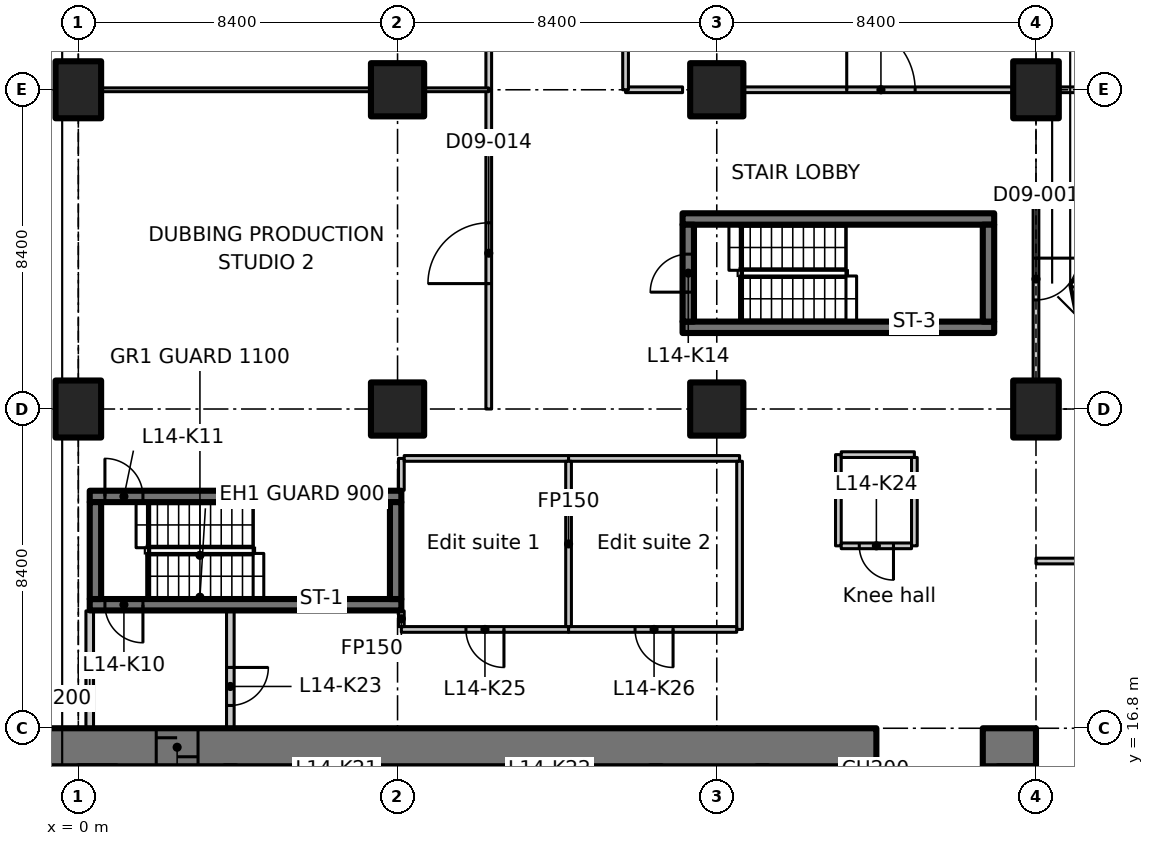
"""IFC4 building model, lengths in metres.
Left out: names, types, materials, properties, quantities, classifications, styles, units other than length and angle.
Written with IfcOpenShell. Run it as: python <this file> out.ifc"""

import sys

from ifc_helpers import new_model, si_unit, direction, frame, frame_2d, origin, origin_2d, place, context, subcontext, project, spatial, polyline, rectangle, outline, extrude, element, fill, save


model = new_model("IFC4")
c1 = context("Model", 3, precision=1e-05, world=origin(), true_north=direction((0.0, 1.0)))
c2 = subcontext(c1, "Body", "Model", "MODEL_VIEW")
j1 = project(units=[si_unit("LENGTHUNIT", "METRE"), si_unit("PLANEANGLEUNIT", "RADIAN")], contexts=[c1])
p1 = place(None, origin())
s1 = spatial("IfcSite", under=j1, at=p1, CompositionType="ELEMENT")
p2 = place(p1, origin())
s2 = spatial("IfcBuilding", under=s1, at=p2, CompositionType="ELEMENT")
p3 = place(p2, frame((0.0, 0.0, 65.3)))
s3 = spatial("IfcBuildingStorey", under=s2, at=p3, CompositionType="ELEMENT", Elevation=65.3)
for number, where, z_axis, x_axis in (
    (1, (0.0, 25.2, 0.0), (0.0, 0.0, 1.0), (1.0, 0.0, 0.0)),
    (2, (0.0, 33.6, 0.0), (0.0, 0.0, 1.0), (1.0, 0.0, 0.0)),
):
    element("IfcColumn", number, at=place(p3, frame(where, z_axis=z_axis, x_axis=x_axis)), inside=s3, PredefinedType="COLUMN", context=c2, shape_type="SweptSolid", body=[
        extrude(rectangle(XDim=1.2, YDim=1.5, at=origin_2d()), origin(), (0.0, 0.0, 1.0), 3.35),
    ])
for number, where, z_axis, x_axis in (
    (3, (8.4, 25.2, 0.0), (0.0, 0.0, 1.0), (1.0, 0.0, 0.0)),
    (4, (8.4, 33.6, 0.0), (0.0, 0.0, 1.0), (1.0, 0.0, 0.0)),
    (5, (16.8, 25.2, 0.0), (0.0, 0.0, 1.0), (1.0, 0.0, 0.0)),
    (6, (16.8, 33.6, 0.0), (0.0, 0.0, 1.0), (1.0, 0.0, 0.0)),
):
    element("IfcColumn", number, at=place(p3, frame(where, z_axis=z_axis, x_axis=x_axis)), inside=s3, PredefinedType="COLUMN", context=c2, shape_type="SweptSolid", body=[
        extrude(rectangle(XDim=1.4, YDim=1.4, at=origin_2d()), origin(), (0.0, 0.0, 1.0), 3.35),
    ])
for number, where, z_axis, x_axis in (
    (7, (25.2, 25.2, 0.0), (0.0, 0.0, 1.0), (1.0, 0.0, 0.0)),
    (8, (25.2, 33.6, 0.0), (0.0, 0.0, 1.0), (1.0, 0.0, 0.0)),
):
    element("IfcColumn", number, at=place(p3, frame(where, z_axis=z_axis, x_axis=x_axis)), inside=s3, PredefinedType="COLUMN", context=c2, shape_type="SweptSolid", body=[
        extrude(rectangle(XDim=1.2, YDim=1.5, at=origin_2d()), origin(), (0.0, 0.0, 1.0), 3.35),
    ])
p4 = place(p3, frame((-1.1, 16.3, 0.0), z_axis=(0.0, 0.0, 1.0), x_axis=(1.0, 0.0, 0.0)))
e9 = element("IfcWall", 9, at=p4, inside=s3, PredefinedType="SHEAR", context=c2, shape_type="SweptSolid", body=[
    extrude(rectangle(XDim=22.1, YDim=1.0, at=frame_2d((11.05, 0.0))), origin(), (0.0, 0.0, 1.0), 3.35),
])
p5 = place(p4, frame((3.15, 0.0, 0.0)))
e10 = element("IfcOpeningElement", 10, at=p5, cuts=e9, PredefinedType="OPENING", context=c2, shape_type="SweptSolid", body=[
    extrude(rectangle(XDim=1.1, YDim=2.3, at=frame_2d((0.55, 1.15))), frame((0.0, 0.51, 0.0), z_axis=(0.0, -1.0, 0.0), x_axis=(1.0, 0.0, 0.0)), (0.0, 0.0, 1.0), 1.02),
])
p6 = place(p3, frame((23.8, 16.3, 0.0), z_axis=(0.0, 0.0, 1.0), x_axis=(1.0, 0.0, 0.0)))
e11 = element("IfcWall", 11, at=p6, inside=s3, PredefinedType="SHEAR", context=c2, shape_type="SweptSolid", body=[
    extrude(rectangle(XDim=1.4, YDim=1.0, at=frame_2d((0.7, 0.0))), origin(), (0.0, 0.0, 1.0), 3.35),
])
p7 = place(p3, frame((24.7, 12.6, 0.0), z_axis=(0.0, 0.0, 1.0), x_axis=(0.0, 1.0, 0.0)))
e12 = element("IfcWall", 12, at=p7, inside=s3, PredefinedType="SHEAR", context=c2, shape_type="SweptSolid", body=[
    extrude(rectangle(XDim=3.2, YDim=1.0, at=frame_2d((1.6, 0.0))), origin(), (0.0, 0.0, 1.0), 3.35),
])
p8 = place(p3, frame((8.5, 20.05, 0.0), z_axis=(0.0, 0.0, 1.0), x_axis=(-1.0, 0.0, 0.0)))
e13 = element("IfcWall", 13, at=p8, inside=s3, PredefinedType="SHEAR", context=c2, shape_type="SweptSolid", body=[
    extrude(rectangle(XDim=8.2, YDim=0.3, at=frame_2d((4.1, 0.0))), origin(), (0.0, 0.0, 1.0), 3.35),
])
p9 = place(p8, frame((6.8, 0.0, 0.0)))
e14 = element("IfcOpeningElement", 14, at=p9, cuts=e13, PredefinedType="OPENING", context=c2, shape_type="SweptSolid", body=[
    extrude(rectangle(XDim=1.0, YDim=2.1, at=frame_2d((0.5, 1.05))), frame((0.0, 0.16, 0.0), z_axis=(0.0, -1.0, 0.0), x_axis=(1.0, 0.0, 0.0)), (0.0, 0.0, 1.0), 0.32),
])
p10 = place(p3, frame((0.3, 22.9, 0.0), z_axis=(0.0, 0.0, 1.0), x_axis=(1.0, 0.0, 0.0)))
e15 = element("IfcWall", 15, at=p10, inside=s3, PredefinedType="SHEAR", context=c2, shape_type="SweptSolid", body=[
    extrude(rectangle(XDim=8.2, YDim=0.3, at=frame_2d((4.1, 0.0))), origin(), (0.0, 0.0, 1.0), 3.35),
])
p11 = place(p10, frame((0.4, 0.0, 0.0)))
e16 = element("IfcOpeningElement", 16, at=p11, cuts=e15, PredefinedType="OPENING", context=c2, shape_type="SweptSolid", body=[
    extrude(rectangle(XDim=1.0, YDim=2.1, at=frame_2d((0.5, 1.05))), frame((0.0, 0.16, 0.0), z_axis=(0.0, -1.0, 0.0), x_axis=(1.0, 0.0, 0.0)), (0.0, 0.0, 1.0), 0.32),
])
for number, where, z_axis, x_axis in (
    (17, (0.45, 20.2, 0.0), (0.0, 0.0, 1.0), (0.0, 1.0, 0.0)),
    (18, (8.35, 20.2, 0.0), (0.0, 0.0, 1.0), (0.0, 1.0, 0.0)),
):
    element("IfcWall", number, at=place(p3, frame(where, z_axis=z_axis, x_axis=x_axis)), inside=s3, PredefinedType="SHEAR", context=c2, shape_type="SweptSolid", body=[
        extrude(rectangle(XDim=2.55, YDim=0.3, at=frame_2d((1.275, 0.0))), origin(), (0.0, 0.0, 1.0), 3.35),
    ])
for number, where, z_axis, x_axis in (
    (19, (15.9, 27.35, 0.0), (0.0, 0.0, 1.0), (1.0, 0.0, 0.0)),
    (20, (15.9, 30.2, 0.0), (0.0, 0.0, 1.0), (1.0, 0.0, 0.0)),
):
    element("IfcWall", number, at=place(p3, frame(where, z_axis=z_axis, x_axis=x_axis)), inside=s3, PredefinedType="SHEAR", context=c2, shape_type="SweptSolid", body=[
        extrude(rectangle(XDim=8.2, YDim=0.3, at=frame_2d((4.1, 0.0))), origin(), (0.0, 0.0, 1.0), 3.35),
    ])
p12 = place(p3, frame((16.05, 27.5, 0.0), z_axis=(0.0, 0.0, 1.0), x_axis=(0.0, 1.0, 0.0)))
e21 = element("IfcWall", 21, at=p12, inside=s3, PredefinedType="SHEAR", context=c2, shape_type="SweptSolid", body=[
    extrude(rectangle(XDim=2.55, YDim=0.3, at=frame_2d((1.275, 0.0))), origin(), (0.0, 0.0, 1.0), 3.35),
])
p13 = place(p12, frame((0.775, 0.0, 0.0)))
e22 = element("IfcOpeningElement", 22, at=p13, cuts=e21, PredefinedType="OPENING", context=c2, shape_type="SweptSolid", body=[
    extrude(rectangle(XDim=1.0, YDim=2.1, at=frame_2d((0.5, 1.05))), frame((0.0, 0.16, 0.0), z_axis=(0.0, -1.0, 0.0), x_axis=(1.0, 0.0, 0.0)), (0.0, 0.0, 1.0), 0.32),
])
p14 = place(p3, frame((23.95, 27.5, 0.0), z_axis=(0.0, 0.0, 1.0), x_axis=(0.0, 1.0, 0.0)))
e23 = element("IfcWall", 23, at=p14, inside=s3, PredefinedType="SHEAR", context=c2, shape_type="SweptSolid", body=[
    extrude(rectangle(XDim=2.55, YDim=0.3, at=frame_2d((1.275, 0.0))), origin(), (0.0, 0.0, 1.0), 3.35),
])
p15 = place(p3, frame((0.3, 16.812, 0.0), z_axis=(0.0, 0.0, 1.0), x_axis=(0.0, 1.0, 0.0)))
e24 = element("IfcWall", 24, at=p15, inside=s3, PredefinedType="PARTITIONING", context=c2, shape_type="SweptSolid", body=[
    extrude(rectangle(XDim=3.076, YDim=0.2, at=frame_2d((1.538, 0.0))), origin(), (0.0, 0.0, 1.0), 2.98),
])
p16 = place(p3, frame((4.0, 19.888, 0.0), z_axis=(0.0, 0.0, 1.0), x_axis=(0.0, -1.0, 0.0)))
e25 = element("IfcWall", 25, at=p16, inside=s3, PredefinedType="PARTITIONING", context=c2, shape_type="SweptSolid", body=[
    extrude(rectangle(XDim=3.076, YDim=0.2, at=frame_2d((1.538, 0.0))), origin(), (0.0, 0.0, 1.0), 3.35),
])
p17 = place(p16, frame((1.488, 0.0, 0.0)))
e26 = element("IfcOpeningElement", 26, at=p17, cuts=e25, PredefinedType="OPENING", context=c2, shape_type="SweptSolid", body=[
    extrude(rectangle(XDim=1.0, YDim=2.1, at=frame_2d((0.5, 1.05))), frame((0.0, 0.11, 0.0), z_axis=(0.0, -1.0, 0.0), x_axis=(1.0, 0.0, 0.0)), (0.0, 0.0, 1.0), 0.22),
])
p18 = place(p3, frame((12.9, 19.4, 0.0), z_axis=(0.0, 0.0, 1.0), x_axis=(-1.0, 0.0, 0.0)))
e27 = element("IfcWall", 27, at=p18, inside=s3, PredefinedType="PARTITIONING", context=c2, shape_type="SweptSolid", body=[
    extrude(rectangle(XDim=4.4, YDim=0.15, at=frame_2d((2.2, 0.0))), origin(), (0.0, 0.0, 1.0), 3.35),
])
p19 = place(p18, frame((1.7, 0.0, 0.0)))
e28 = element("IfcOpeningElement", 28, at=p19, cuts=e27, PredefinedType="OPENING", context=c2, shape_type="SweptSolid", body=[
    extrude(rectangle(XDim=1.0, YDim=2.1, at=frame_2d((0.5, 1.05))), frame((0.0, 0.085, 0.0), z_axis=(0.0, -1.0, 0.0), x_axis=(1.0, 0.0, 0.0)), (0.0, 0.0, 1.0), 0.17),
])
p20 = place(p3, frame((8.5, 19.475, 0.0), z_axis=(0.0, 0.0, 1.0), x_axis=(0.0, 1.0, 0.0)))
e29 = element("IfcWall", 29, at=p20, inside=s3, PredefinedType="PARTITIONING", context=c2, shape_type="SweptSolid", body=[
    extrude(rectangle(XDim=0.413, YDim=0.15, at=frame_2d((0.207, 0.0))), origin(), (0.0, 0.0, 1.0), 3.35),
])
p21 = place(p3, frame((8.5, 23.062, 0.0), z_axis=(0.0, 0.0, 1.0), x_axis=(0.0, 1.0, 0.0)))
e30 = element("IfcWall", 30, at=p21, inside=s3, PredefinedType="PARTITIONING", context=c2, shape_type="SweptSolid", body=[
    extrude(rectangle(XDim=0.838, YDim=0.15, at=frame_2d((0.419, 0.0))), origin(), (0.0, 0.0, 1.0), 3.35),
])
p22 = place(p3, frame((8.575, 23.9, 0.0), z_axis=(0.0, 0.0, 1.0), x_axis=(1.0, 0.0, 0.0)))
e31 = element("IfcWall", 31, at=p22, inside=s3, PredefinedType="PARTITIONING", context=c2, shape_type="SweptSolid", body=[
    extrude(rectangle(XDim=4.325, YDim=0.15, at=frame_2d((2.163, 0.0))), origin(), (0.0, 0.0, 1.0), 3.35),
])
p23 = place(p3, frame((12.9, 23.9, 0.0), z_axis=(0.0, 0.0, 1.0), x_axis=(1.0, 0.0, 0.0)))
e32 = element("IfcWall", 32, at=p23, inside=s3, PredefinedType="PARTITIONING", context=c2, shape_type="SweptSolid", body=[
    extrude(rectangle(XDim=4.5, YDim=0.15, at=frame_2d((2.25, 0.0))), origin(), (0.0, 0.0, 1.0), 3.35),
])
p24 = place(p3, frame((17.4, 23.825, 0.0), z_axis=(0.0, 0.0, 1.0), x_axis=(0.0, -1.0, 0.0)))
e33 = element("IfcWall", 33, at=p24, inside=s3, PredefinedType="PARTITIONING", context=c2, shape_type="SweptSolid", body=[
    extrude(rectangle(XDim=4.425, YDim=0.15, at=frame_2d((2.212, 0.0))), origin(), (0.0, 0.0, 1.0), 3.35),
])
p25 = place(p3, frame((17.325, 19.4, 0.0), z_axis=(0.0, 0.0, 1.0), x_axis=(-1.0, 0.0, 0.0)))
e34 = element("IfcWall", 34, at=p25, inside=s3, PredefinedType="PARTITIONING", context=c2, shape_type="SweptSolid", body=[
    extrude(rectangle(XDim=4.425, YDim=0.15, at=frame_2d((2.212, 0.0))), origin(), (0.0, 0.0, 1.0), 3.35),
])
p26 = place(p25, frame((1.675, 0.0, 0.0)))
e35 = element("IfcOpeningElement", 35, at=p26, cuts=e34, PredefinedType="OPENING", context=c2, shape_type="SweptSolid", body=[
    extrude(rectangle(XDim=1.0, YDim=2.1, at=frame_2d((0.5, 1.05))), frame((0.0, 0.085, 0.0), z_axis=(0.0, -1.0, 0.0), x_axis=(1.0, 0.0, 0.0)), (0.0, 0.0, 1.0), 0.17),
])
p27 = place(p3, frame((12.9, 23.825, 0.0), z_axis=(0.0, 0.0, 1.0), x_axis=(0.0, -1.0, 0.0)))
e36 = element("IfcWall", 36, at=p27, inside=s3, PredefinedType="PARTITIONING", context=c2, shape_type="SweptSolid", body=[
    extrude(rectangle(XDim=4.35, YDim=0.15, at=frame_2d((2.175, 0.0))), origin(), (0.0, 0.0, 1.0), 3.35),
])
p28 = place(p3, frame((20.0, 21.6, 0.0), z_axis=(0.0, 0.0, 1.0), x_axis=(0.0, 1.0, 0.0)))
e37 = element("IfcWall", 37, at=p28, inside=s3, PredefinedType="PARTITIONING", context=c2, shape_type="SweptSolid", body=[
    extrude(rectangle(XDim=2.4, YDim=0.15, at=frame_2d((1.2, 0.0))), origin(), (0.0, 0.0, 1.0), 3.35),
])
p29 = place(p3, frame((20.075, 24.0, 0.0), z_axis=(0.0, 0.0, 1.0), x_axis=(1.0, 0.0, 0.0)))
e38 = element("IfcWall", 38, at=p29, inside=s3, PredefinedType="PARTITIONING", context=c2, shape_type="SweptSolid", body=[
    extrude(rectangle(XDim=1.925, YDim=0.15, at=frame_2d((0.962, 0.0))), origin(), (0.0, 0.0, 1.0), 3.35),
])
p30 = place(p3, frame((22.0, 23.925, 0.0), z_axis=(0.0, 0.0, 1.0), x_axis=(0.0, -1.0, 0.0)))
e39 = element("IfcWall", 39, at=p30, inside=s3, PredefinedType="PARTITIONING", context=c2, shape_type="SweptSolid", body=[
    extrude(rectangle(XDim=2.325, YDim=0.15, at=frame_2d((1.163, 0.0))), origin(), (0.0, 0.0, 1.0), 3.35),
])
p31 = place(p3, frame((21.925, 21.6, 0.0), z_axis=(0.0, 0.0, 1.0), x_axis=(-1.0, 0.0, 0.0)))
e40 = element("IfcWall", 40, at=p31, inside=s3, PredefinedType="PARTITIONING", context=c2, shape_type="SweptSolid", body=[
    extrude(rectangle(XDim=1.85, YDim=0.15, at=frame_2d((0.925, 0.0))), origin(), (0.0, 0.0, 1.0), 3.35),
])
p32 = place(p31, frame((0.475, 0.0, 0.0)))
e41 = element("IfcOpeningElement", 41, at=p32, cuts=e40, PredefinedType="OPENING", context=c2, shape_type="SweptSolid", body=[
    extrude(rectangle(XDim=0.9, YDim=2.1, at=frame_2d((0.45, 1.05))), frame((0.0, 0.085, 0.0), z_axis=(0.0, -1.0, 0.0), x_axis=(1.0, 0.0, 0.0)), (0.0, 0.0, 1.0), 0.17),
])
p33 = place(p3, frame((25.2, 21.2, 0.0), z_axis=(0.0, 0.0, 1.0), x_axis=(1.0, 0.0, 0.0)))
e42 = element("IfcWall", 42, at=p33, inside=s3, PredefinedType="PARTITIONING", context=c2, shape_type="SweptSolid", body=[
    extrude(rectangle(XDim=4.2, YDim=0.15, at=frame_2d((2.1, 0.0))), origin(), (0.0, 0.0, 1.0), 3.33),
])
p34 = place(p3, frame((25.2, 31.0, 0.0), z_axis=(0.0, 0.0, 1.0), x_axis=(0.0, -1.0, 0.0)))
e43 = element("IfcWall", 43, at=p34, inside=s3, PredefinedType="PARTITIONING", context=c2, shape_type="SweptSolid", body=[
    extrude(outline(polyline([(0.0, 0.0), (5.03, 0.0), (5.03, 2.98), (0.0, 2.98), (0.0, 0.0)])), frame((0.0, 0.075, 0.0), z_axis=(0.0, -1.0, 0.0), x_axis=(1.0, 0.0, 0.0)), (0.0, 0.0, 1.0), 0.15),
])
p35 = place(p34, frame((1.83, 0.0, 0.0)))
e44 = element("IfcOpeningElement", 44, at=p35, cuts=e43, PredefinedType="OPENING", context=c2, shape_type="SweptSolid", body=[
    extrude(rectangle(XDim=1.1, YDim=2.1, at=frame_2d((0.55, 1.05))), frame((0.0, 0.085, 0.0), z_axis=(0.0, -1.0, 0.0), x_axis=(1.0, 0.0, 0.0)), (0.0, 0.0, 1.0), 0.17),
])
p36 = place(p3, frame((25.2, 31.0, 0.0), z_axis=(0.0, 0.0, 1.0), x_axis=(1.0, 0.0, 0.0)))
e45 = element("IfcWall", 45, at=p36, inside=s3, PredefinedType="PARTITIONING", context=c2, shape_type="SweptSolid", body=[
    extrude(rectangle(XDim=3.324, YDim=0.15, at=frame_2d((1.662, 0.0))), origin(), (0.0, 0.0, 1.0), 2.98),
])
p37 = place(p3, frame((10.8, 25.2, 0.0), z_axis=(0.0, 0.0, 1.0), x_axis=(0.0, 1.0, 0.0)))
e46 = element("IfcWall", 46, at=p37, inside=s3, PredefinedType="PARTITIONING", context=c2, shape_type="SweptSolid", body=[
    extrude(rectangle(XDim=8.4, YDim=0.15, at=frame_2d((4.2, 0.0))), origin(), (0.0, 0.0, 1.0), 3.33),
])
p38 = place(p37, frame((3.3, 0.0, 0.0)))
e47 = element("IfcOpeningElement", 47, at=p38, cuts=e46, PredefinedType="OPENING", context=c2, shape_type="SweptSolid", body=[
    extrude(rectangle(XDim=1.6, YDim=2.1, at=frame_2d((0.8, 1.05))), frame((0.0, 0.085, 0.0), z_axis=(0.0, -1.0, 0.0), x_axis=(1.0, 0.0, 0.0)), (0.0, 0.0, 1.0), 0.17),
])
p39 = place(p3, frame((14.4, 33.6, 0.0), z_axis=(0.0, 0.0, 1.0), x_axis=(1.0, 0.0, 0.0)))
e48 = element("IfcWall", 48, at=p39, inside=s3, PredefinedType="PARTITIONING", context=c2, shape_type="SweptSolid", body=[
    extrude(rectangle(XDim=1.5, YDim=0.15, at=frame_2d((0.75, 0.0))), origin(), (0.0, 0.0, 1.0), 3.33),
])
p40 = place(p3, frame((17.52, 33.6, 0.0), z_axis=(0.0, 0.0, 1.0), x_axis=(1.0, 0.0, 0.0)))
e49 = element("IfcWall", 49, at=p40, inside=s3, PredefinedType="PARTITIONING", context=c2, shape_type="SweptSolid", body=[
    extrude(rectangle(XDim=7.06, YDim=0.15, at=frame_2d((3.53, 0.0))), origin(), (0.0, 0.0, 1.0), 3.33),
])
p41 = place(p40, frame((2.7, 0.0, 0.0)))
e50 = element("IfcOpeningElement", 50, at=p41, cuts=e49, PredefinedType="OPENING", context=c2, shape_type="SweptSolid", body=[
    extrude(rectangle(XDim=1.8, YDim=2.1, at=frame_2d((0.9, 1.05))), frame((0.0, 0.085, 0.0), z_axis=(0.0, -1.0, 0.0), x_axis=(1.0, 0.0, 0.0)), (0.0, 0.0, 1.0), 0.17),
])
p42 = place(p3, frame((25.82, 33.6, 0.0), z_axis=(0.0, 0.0, 1.0), x_axis=(1.0, 0.0, 0.0)))
e51 = element("IfcWall", 51, at=p42, inside=s3, PredefinedType="PARTITIONING", context=c2, shape_type="SweptSolid", body=[
    extrude(rectangle(XDim=3.942, YDim=0.15, at=frame_2d((1.971, 0.0))), origin(), (0.0, 0.0, 1.0), 2.98),
])
p43 = place(p3, frame((10.8, 33.6, 0.0), z_axis=(0.0, 0.0, 1.0), x_axis=(0.0, 1.0, 0.0)))
e52 = element("IfcWall", 52, at=p43, inside=s3, PredefinedType="PARTITIONING", context=c2, shape_type="SweptSolid", body=[
    extrude(rectangle(XDim=8.4, YDim=0.15, at=frame_2d((4.2, 0.0))), origin(), (0.0, 0.0, 1.0), 3.33),
])
p44 = place(p43, frame((3.3, 0.0, 0.0)))
e53 = element("IfcOpeningElement", 53, at=p44, cuts=e52, PredefinedType="OPENING", context=c2, shape_type="SweptSolid", body=[
    extrude(rectangle(XDim=1.6, YDim=2.1, at=frame_2d((0.8, 1.05))), frame((0.0, 0.085, 0.0), z_axis=(0.0, -1.0, 0.0), x_axis=(1.0, 0.0, 0.0)), (0.0, 0.0, 1.0), 0.17),
])
p45 = place(p3, frame((14.4, 42.0, 0.0), z_axis=(0.0, 0.0, 1.0), x_axis=(0.0, -1.0, 0.0)))
e54 = element("IfcWall", 54, at=p45, inside=s3, PredefinedType="PARTITIONING", context=c2, shape_type="SweptSolid", body=[
    extrude(rectangle(XDim=8.4, YDim=0.15, at=frame_2d((4.2, 0.0))), origin(), (0.0, 0.0, 1.0), 3.33),
])
p46 = place(p3, frame((0.62, 33.6, 0.0), z_axis=(0.0, 0.0, 1.0), x_axis=(1.0, 0.0, 0.0)))
e55 = element("IfcWall", 55, at=p46, inside=s3, PredefinedType="PARTITIONING", context=c2, shape_type="SweptSolid", body=[
    extrude(rectangle(XDim=7.06, YDim=0.1, at=frame_2d((3.53, 0.0))), origin(), (0.0, 0.0, 1.0), 3.33),
])
p47 = place(p3, frame((9.12, 33.6, 0.0), z_axis=(0.0, 0.0, 1.0), x_axis=(1.0, 0.0, 0.0)))
e56 = element("IfcWall", 56, at=p47, inside=s3, PredefinedType="PARTITIONING", context=c2, shape_type="SweptSolid", body=[
    extrude(rectangle(XDim=1.68, YDim=0.1, at=frame_2d((0.84, 0.0))), origin(), (0.0, 0.0, 1.0), 3.33),
])
p48 = place(p5, origin())
e57 = element("IfcDoor", 57, at=p48, inside=s3, OperationType="SLIDING_TO_LEFT", PredefinedType="DOOR", context=c2, shape_type="SweptSolid", body=[
    extrude(rectangle(XDim=1.1, YDim=2.3, at=frame_2d((0.55, 1.15))), frame((0.0, 0.025, 0.0), z_axis=(0.0, -1.0, 0.0), x_axis=(1.0, 0.0, 0.0)), (0.0, 0.0, 1.0), 0.05),
])
fill(e10, e57)
p49 = place(p9, origin())
e58 = element("IfcDoor", 58, at=p49, inside=s3, OperationType="SINGLE_SWING_LEFT", PredefinedType="DOOR", context=c2, shape_type="SweptSolid", body=[
    extrude(rectangle(XDim=1.0, YDim=2.1, at=frame_2d((0.5, 1.05))), frame((0.0, 0.025, 0.0), z_axis=(0.0, -1.0, 0.0), x_axis=(1.0, 0.0, 0.0)), (0.0, 0.0, 1.0), 0.05),
])
fill(e14, e58)
p50 = place(p11, origin())
e59 = element("IfcDoor", 59, at=p50, inside=s3, OperationType="SINGLE_SWING_RIGHT", PredefinedType="DOOR", context=c2, shape_type="SweptSolid", body=[
    extrude(rectangle(XDim=1.0, YDim=2.1, at=frame_2d((0.5, 1.05))), frame((0.0, 0.025, 0.0), z_axis=(0.0, -1.0, 0.0), x_axis=(1.0, 0.0, 0.0)), (0.0, 0.0, 1.0), 0.05),
])
fill(e16, e59)
p51 = place(p13, origin())
e60 = element("IfcDoor", 60, at=p51, inside=s3, OperationType="SINGLE_SWING_LEFT", PredefinedType="DOOR", context=c2, shape_type="SweptSolid", body=[
    extrude(rectangle(XDim=1.0, YDim=2.1, at=frame_2d((0.5, 1.05))), frame((0.0, 0.025, 0.0), z_axis=(0.0, -1.0, 0.0), x_axis=(1.0, 0.0, 0.0)), (0.0, 0.0, 1.0), 0.05),
])
fill(e22, e60)
p52 = place(p17, origin())
e61 = element("IfcDoor", 61, at=p52, inside=s3, OperationType="SINGLE_SWING_RIGHT", PredefinedType="DOOR", context=c2, shape_type="SweptSolid", body=[
    extrude(rectangle(XDim=1.0, YDim=2.1, at=frame_2d((0.5, 1.05))), frame((0.0, 0.025, 0.0), z_axis=(0.0, -1.0, 0.0), x_axis=(1.0, 0.0, 0.0)), (0.0, 0.0, 1.0), 0.05),
])
fill(e26, e61)
p53 = place(p32, origin())
e62 = element("IfcDoor", 62, at=p53, inside=s3, OperationType="SINGLE_SWING_LEFT", PredefinedType="DOOR", context=c2, shape_type="SweptSolid", body=[
    extrude(rectangle(XDim=0.9, YDim=2.1, at=frame_2d((0.45, 1.05))), frame((0.0, 0.025, 0.0), z_axis=(0.0, -1.0, 0.0), x_axis=(1.0, 0.0, 0.0)), (0.0, 0.0, 1.0), 0.05),
])
fill(e41, e62)
p54 = place(p19, origin())
e63 = element("IfcDoor", 63, at=p54, inside=s3, OperationType="SINGLE_SWING_RIGHT", PredefinedType="DOOR", context=c2, shape_type="SweptSolid", body=[
    extrude(rectangle(XDim=1.0, YDim=2.1, at=frame_2d((0.5, 1.05))), frame((0.0, 0.025, 0.0), z_axis=(0.0, -1.0, 0.0), x_axis=(1.0, 0.0, 0.0)), (0.0, 0.0, 1.0), 0.05),
])
fill(e28, e63)
p55 = place(p26, origin())
e64 = element("IfcDoor", 64, at=p55, inside=s3, OperationType="SINGLE_SWING_LEFT", PredefinedType="DOOR", context=c2, shape_type="SweptSolid", body=[
    extrude(rectangle(XDim=1.0, YDim=2.1, at=frame_2d((0.5, 1.05))), frame((0.0, 0.025, 0.0), z_axis=(0.0, -1.0, 0.0), x_axis=(1.0, 0.0, 0.0)), (0.0, 0.0, 1.0), 0.05),
])
fill(e35, e64)
p56 = place(p35, origin())
e65 = element("IfcDoor", 65, at=p56, inside=s3, OperationType="SINGLE_SWING_RIGHT", PredefinedType="DOOR", context=c2, shape_type="SweptSolid", body=[
    extrude(rectangle(XDim=1.1, YDim=2.1, at=frame_2d((0.55, 1.05))), frame((0.0, 0.025, 0.0), z_axis=(0.0, -1.0, 0.0), x_axis=(1.0, 0.0, 0.0)), (0.0, 0.0, 1.0), 0.05),
])
fill(e44, e65)
p57 = place(p38, origin())
e66 = element("IfcDoor", 66, at=p57, inside=s3, OperationType="DOUBLE_DOOR_SINGLE_SWING", PredefinedType="DOOR", context=c2, shape_type="SweptSolid", body=[
    extrude(rectangle(XDim=1.6, YDim=2.1, at=frame_2d((0.8, 1.05))), frame((0.0, 0.025, 0.0), z_axis=(0.0, -1.0, 0.0), x_axis=(1.0, 0.0, 0.0)), (0.0, 0.0, 1.0), 0.05),
])
fill(e47, e66)
p58 = place(p41, origin())
e67 = element("IfcDoor", 67, at=p58, inside=s3, OperationType="DOUBLE_DOOR_SINGLE_SWING", PredefinedType="DOOR", context=c2, shape_type="SweptSolid", body=[
    extrude(rectangle(XDim=1.8, YDim=2.1, at=frame_2d((0.9, 1.05))), frame((0.0, 0.025, 0.0), z_axis=(0.0, -1.0, 0.0), x_axis=(1.0, 0.0, 0.0)), (0.0, 0.0, 1.0), 0.05),
])
fill(e50, e67)
save(model, sys.argv[1])
